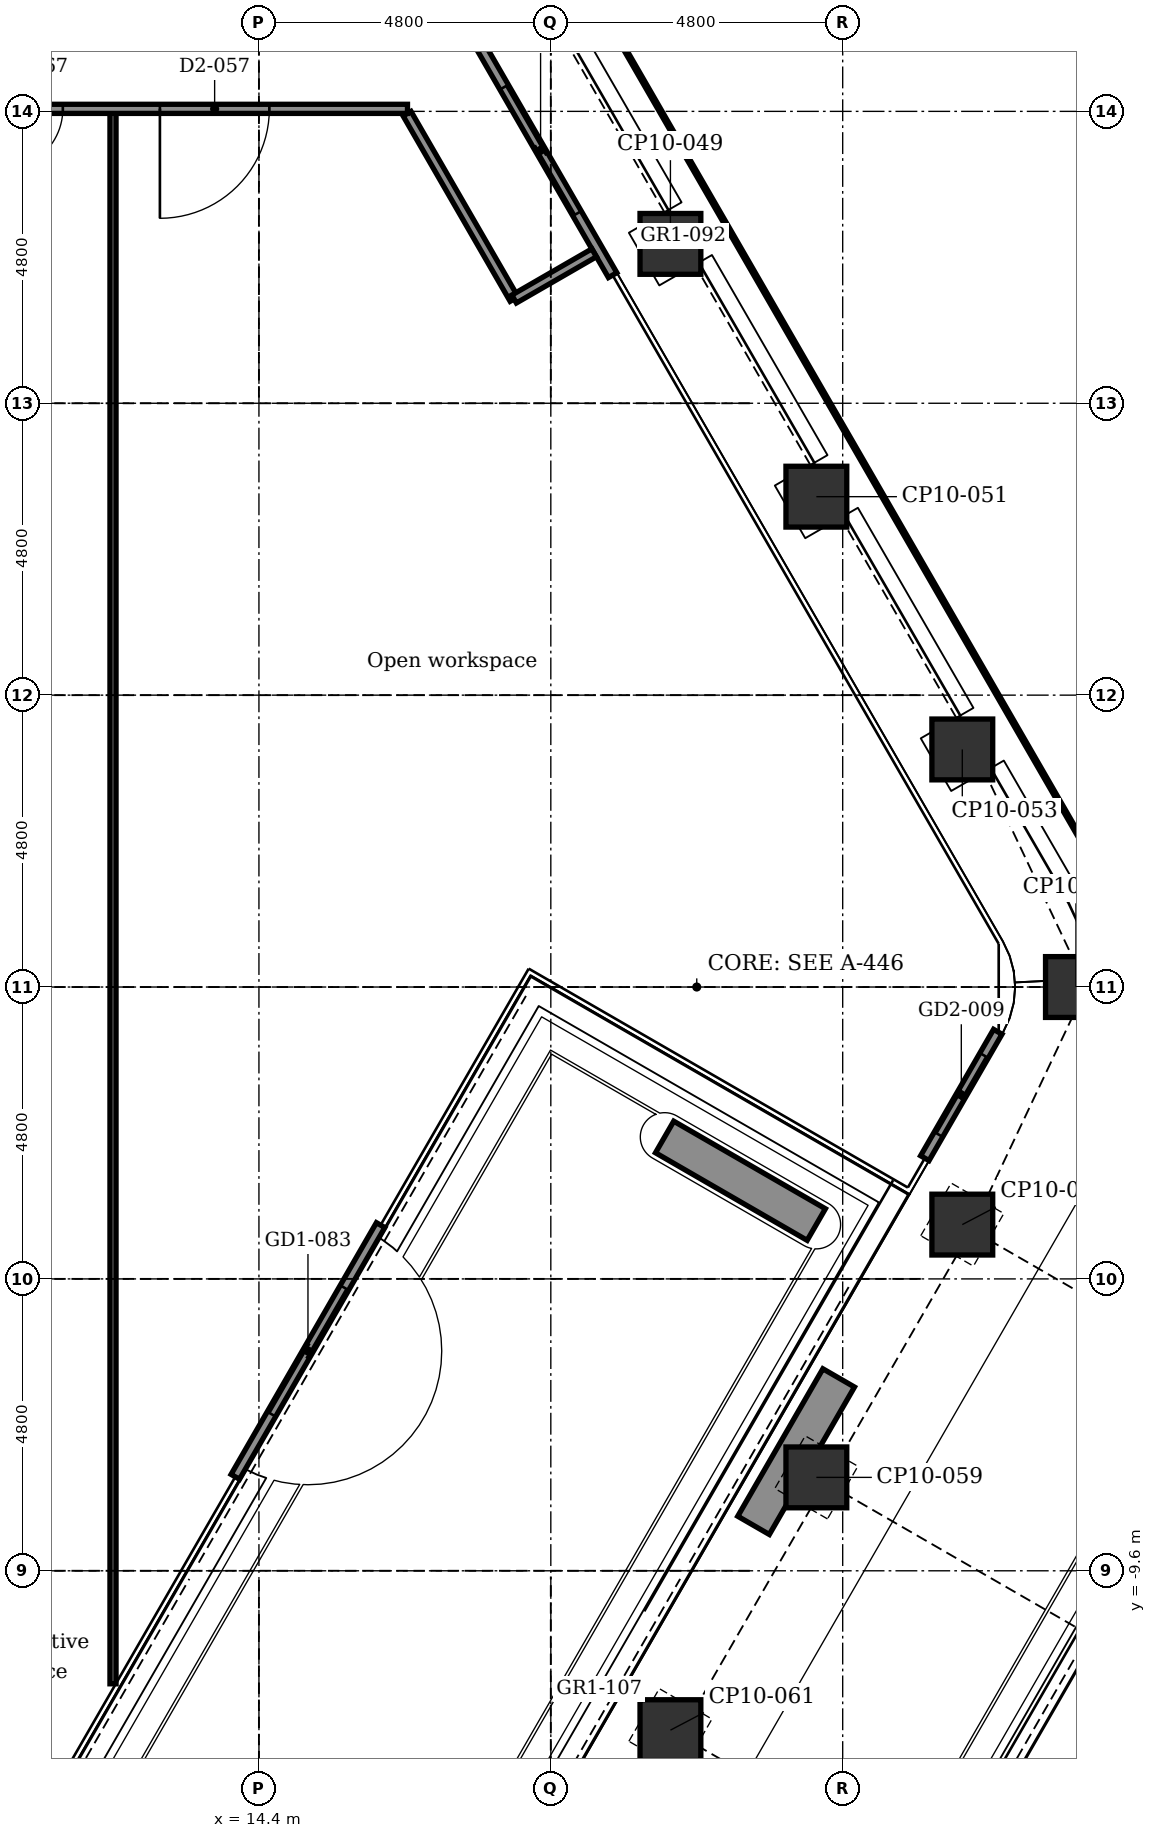
"""IFC4 building model, lengths in metres.
Left out: names, types, materials, properties, quantities, classifications, styles, units other than length and angle.
Written with IfcOpenShell. Run it as: python <this file> out.ifc"""

import sys

from ifc_helpers import new_model, si_unit, direction, frame, frame_2d, origin, origin_2d, place, context, subcontext, project, spatial, rectangle, extrude, element, fill, save


model = new_model("IFC4")
c1 = context("Model", 3, precision=1e-05, world=origin(), true_north=direction((0.0, 1.0)))
c2 = subcontext(c1, "Body", "Model", "MODEL_VIEW")
j1 = project(units=[si_unit("LENGTHUNIT", "METRE"), si_unit("PLANEANGLEUNIT", "RADIAN")], contexts=[c1])
p1 = place(None, origin())
s1 = spatial("IfcSite", under=j1, at=p1, CompositionType="ELEMENT")
p2 = place(p1, origin())
s2 = spatial("IfcBuilding", under=s1, at=p2, CompositionType="ELEMENT")
p3 = place(p2, frame((0.0, 0.0, 197.3)))
s3 = spatial("IfcBuildingStorey", under=s2, at=p3, CompositionType="ELEMENT", Elevation=197.3)
for number, where, z_axis, x_axis in (
    (1, (21.167, 12.221, -0.15), (0.0, 0.0, 1.0), (0.866, 0.5, 0.0)),
    (2, (23.567, 8.064, -0.15), (0.0, 0.0, 1.0), (0.866, 0.5, 0.0)),
    (3, (25.967, 3.907, -0.15), (0.0, 0.0, 1.0), (0.866, 0.5, 0.0)),
    (4, (27.836, 0.0, -0.15), (0.0, 0.0, 1.0), (1.0, 0.0, 0.0)),
    (5, (25.967, -3.907, -0.15), (0.0, 0.0, 1.0), (0.5, 0.866, 0.0)),
    (6, (23.567, -8.064, -0.15), (0.0, 0.0, 1.0), (0.5, 0.866, 0.0)),
    (7, (21.167, -12.221, -0.15), (0.0, 0.0, 1.0), (0.5, 0.866, 0.0)),
):
    element("IfcColumn", number, at=place(p3, frame(where, z_axis=z_axis, x_axis=x_axis)), inside=s3, PredefinedType="COLUMN", context=c2, shape_type="SweptSolid", body=[
        extrude(rectangle(XDim=1.0, YDim=1.0, at=origin_2d()), origin(), (0.0, 0.0, 1.0), 3.9),
    ])
p4 = place(p3, frame((17.847, 15.812, 0.0), z_axis=(0.0, 0.0, 1.0), x_axis=(0.5000167099, -0.866015756104, 0.0)))
e8 = element("IfcWall", 8, at=p4, inside=s3, PredefinedType="PARTITIONING", context=c2, shape_type="SweptSolid", body=[
    extrude(rectangle(XDim=4.74, YDim=0.16, at=frame_2d((2.37, 0.0))), origin(), (0.0, 0.0, 1.0), 3.75),
])
p5 = place(p4, frame((1.17, 0.0, 0.0)))
e9 = element("IfcOpeningElement", 9, at=p5, cuts=e8, PredefinedType="OPENING", context=c2, shape_type="SweptSolid", body=[
    extrude(rectangle(XDim=2.4, YDim=2.4, at=frame_2d((1.2, 1.2))), frame((0.0, 0.09, 0.0), z_axis=(0.0, -1.0, 0.0), x_axis=(1.0, 0.0, 0.0)), (0.0, 0.0, 1.0), 0.18),
])
p6 = place(p3, frame((26.551, -0.736, 0.0), z_axis=(0.0, 0.0, 1.0), x_axis=(-0.500001309137, -0.866024647952, 0.0)))
e10 = element("IfcWall", 10, at=p6, inside=s3, PredefinedType="PARTITIONING", context=c2, shape_type="SweptSolid", body=[
    extrude(rectangle(XDim=2.4, YDim=0.16, at=frame_2d((1.2, 0.0))), origin(), (0.0, 0.0, 1.0), 3.75),
])
p7 = place(p6, frame((0.45, 0.0, 0.0)))
e11 = element("IfcOpeningElement", 11, at=p7, cuts=e10, PredefinedType="OPENING", context=c2, shape_type="SweptSolid", body=[
    extrude(rectangle(XDim=1.5, YDim=2.4, at=frame_2d((0.75, 1.2))), frame((0.0, 0.09, 0.0), z_axis=(0.0, -1.0, 0.0), x_axis=(1.0, 0.0, 0.0)), (0.0, 0.0, 1.0), 0.18),
])
p8 = place(p3, frame((16.401, -3.915, 0.0), z_axis=(0.0, 0.0, 1.0), x_axis=(-0.500039310002, -0.866002706955, 0.0)))
e12 = element("IfcWall", 12, at=p8, inside=s3, PredefinedType="PARTITIONING", context=c2, shape_type="SweptSolid", body=[
    extrude(rectangle(XDim=4.78, YDim=0.16, at=frame_2d((2.39, 0.0))), origin(), (0.0, 0.0, 1.0), 3.75),
])
p9 = place(p8, frame((1.19, 0.0, 0.0)))
e13 = element("IfcOpeningElement", 13, at=p9, cuts=e12, PredefinedType="OPENING", context=c2, shape_type="SweptSolid", body=[
    extrude(rectangle(XDim=2.4, YDim=2.4, at=frame_2d((1.2, 1.2))), frame((0.0, 0.09, 0.0), z_axis=(0.0, -1.0, 0.0), x_axis=(1.0, 0.0, 0.0)), (0.0, 0.0, 1.0), 0.18),
])
p10 = place(p3, frame((21.072, -2.466, 0.0), z_axis=(0.0, 0.0, 1.0), x_axis=(0.865996417519, -0.500050202324, 0.0)))
e14 = element("IfcWall", 14, at=p10, inside=s3, PredefinedType="USERDEFINED", context=c2, shape_type="SweptSolid", body=[
    extrude(rectangle(XDim=2.88, YDim=0.6, at=frame_2d((1.44, 0.0))), origin(), (0.0, 0.0, 1.0), 0.7),
])
p11 = place(p3, frame((22.534, -8.853, 0.0), z_axis=(0.0, 0.0, 1.0), x_axis=(0.500049511043, 0.865996816683, 0.0)))
e15 = element("IfcWall", 15, at=p11, inside=s3, PredefinedType="USERDEFINED", context=c2, shape_type="SweptSolid", body=[
    extrude(rectangle(XDim=2.8, YDim=0.6, at=frame_2d((1.4, 0.0))), origin(), (0.0, 0.0, 1.0), 0.7),
])
p12 = place(p3, frame((12.0, -11.458, 0.0), z_axis=(0.0, 0.0, 1.0), x_axis=(0.0, 1.0, 0.0)))
e16 = element("IfcWall", 16, at=p12, inside=s3, PredefinedType="PARTITIONING", context=c2, shape_type="SweptSolid", body=[
    extrude(rectangle(XDim=25.9, YDim=0.1, at=frame_2d((12.95, 0.0))), origin(), (0.0, 0.0, 1.0), 3.75),
])
p13 = place(p3, frame((16.836, 14.362, 0.0), z_axis=(0.0, 0.0, 1.0), x_axis=(0.499980607609, -0.866036599697, 0.0)))
e17 = element("IfcWall", 17, at=p13, inside=s3, PredefinedType="PARTITIONING", context=c2, shape_type="SweptSolid", body=[
    extrude(rectangle(XDim=3.52, YDim=0.15, at=frame_2d((1.76, 0.0))), origin(), (0.0, 0.0, 1.0), 3.75),
])
p14 = place(p3, frame((18.596, 11.314, 0.0), z_axis=(0.0, 0.0, 1.0), x_axis=(0.866030456496, 0.499991248344, 0.0)))
e18 = element("IfcWall", 18, at=p14, inside=s3, PredefinedType="PARTITIONING", context=c2, shape_type="SweptSolid", body=[
    extrude(rectangle(XDim=1.52, YDim=0.15, at=frame_2d((0.76, 0.0))), origin(), (0.0, 0.0, 1.0), 3.75),
])
p15 = place(p3, frame((-3.0, 14.441, 0.0), z_axis=(0.0, 0.0, 1.0), x_axis=(1.0, 0.0, 0.0)))
e19 = element("IfcWall", 19, at=p15, inside=s3, PredefinedType="PARTITIONING", context=c2, shape_type="SweptSolid", body=[
    extrude(rectangle(XDim=19.843, YDim=0.15, at=frame_2d((9.921, 0.0))), origin(), (0.0, 0.0, 1.0), 3.75),
])
p16 = place(p15, frame((4.9, 0.0, 0.0)))
e20 = element("IfcOpeningElement", 20, at=p16, cuts=e19, PredefinedType="OPENING", context=c2, shape_type="SweptSolid", body=[
    extrude(rectangle(XDim=1.0, YDim=2.1, at=frame_2d((0.5, 1.05))), frame((0.0, 0.085, 0.0), z_axis=(0.0, -1.0, 0.0), x_axis=(1.0, 0.0, 0.0)), (0.0, 0.0, 1.0), 0.17),
])
p17 = place(p15, frame((9.7, 0.0, 0.0)))
e21 = element("IfcOpeningElement", 21, at=p17, cuts=e19, PredefinedType="OPENING", context=c2, shape_type="SweptSolid", body=[
    extrude(rectangle(XDim=1.0, YDim=2.1, at=frame_2d((0.5, 1.05))), frame((0.0, 0.085, 0.0), z_axis=(0.0, -1.0, 0.0), x_axis=(1.0, 0.0, 0.0)), (0.0, 0.0, 1.0), 0.17),
])
p18 = place(p15, frame((13.175, 0.0, 0.0)))
e22 = element("IfcOpeningElement", 22, at=p18, cuts=e19, PredefinedType="OPENING", context=c2, shape_type="SweptSolid", body=[
    extrude(rectangle(XDim=1.0, YDim=2.1, at=frame_2d((0.5, 1.05))), frame((0.0, 0.085, 0.0), z_axis=(0.0, -1.0, 0.0), x_axis=(1.0, 0.0, 0.0)), (0.0, 0.0, 1.0), 0.17),
])
p19 = place(p15, frame((15.771, 0.0, 0.0)))
e23 = element("IfcOpeningElement", 23, at=p19, cuts=e19, PredefinedType="OPENING", context=c2, shape_type="SweptSolid", body=[
    extrude(rectangle(XDim=1.8, YDim=2.1, at=frame_2d((0.9, 1.05))), frame((0.0, 0.085, 0.0), z_axis=(0.0, -1.0, 0.0), x_axis=(1.0, 0.0, 0.0)), (0.0, 0.0, 1.0), 0.17),
])
p20 = place(p5, origin())
e24 = element("IfcDoor", 24, at=p20, inside=s3, OperationType="DOUBLE_DOOR_SLIDING", PredefinedType="DOOR", context=c2, shape_type="SweptSolid", body=[
    extrude(rectangle(XDim=2.4, YDim=2.4, at=frame_2d((1.2, 1.2))), frame((0.0, 0.025, 0.0), z_axis=(0.0, -1.0, 0.0), x_axis=(1.0, 0.0, 0.0)), (0.0, 0.0, 1.0), 0.05),
])
fill(e9, e24)
p21 = place(p7, origin())
e25 = element("IfcDoor", 25, at=p21, inside=s3, OperationType="DOUBLE_DOOR_SLIDING", PredefinedType="DOOR", context=c2, shape_type="SweptSolid", body=[
    extrude(rectangle(XDim=1.5, YDim=2.4, at=frame_2d((0.75, 1.2))), frame((0.0, 0.025, 0.0), z_axis=(0.0, -1.0, 0.0), x_axis=(1.0, 0.0, 0.0)), (0.0, 0.0, 1.0), 0.05),
])
fill(e11, e25)
p22 = place(p9, origin())
e26 = element("IfcDoor", 26, at=p22, inside=s3, OperationType="DOUBLE_DOOR_SLIDING", PredefinedType="DOOR", context=c2, shape_type="SweptSolid", body=[
    extrude(rectangle(XDim=2.4, YDim=2.4, at=frame_2d((1.2, 1.2))), frame((0.0, 0.025, 0.0), z_axis=(0.0, -1.0, 0.0), x_axis=(1.0, 0.0, 0.0)), (0.0, 0.0, 1.0), 0.05),
])
fill(e13, e26)
p23 = place(p18, frame((1.0, 0.0, 0.0), z_axis=(0.0, 0.0, 1.0), x_axis=(-1.0, 0.0, 0.0)))
e27 = element("IfcDoor", 27, at=p23, inside=s3, OperationType="SINGLE_SWING_LEFT", PredefinedType="DOOR", context=c2, shape_type="SweptSolid", body=[
    extrude(rectangle(XDim=1.0, YDim=2.1, at=frame_2d((0.5, 1.05))), frame((0.0, 0.025, 0.0), z_axis=(0.0, -1.0, 0.0), x_axis=(1.0, 0.0, 0.0)), (0.0, 0.0, 1.0), 0.05),
])
fill(e22, e27)
p24 = place(p19, frame((1.8, 0.0, 0.0), z_axis=(0.0, 0.0, 1.0), x_axis=(-1.0, 0.0, 0.0)))
e28 = element("IfcDoor", 28, at=p24, inside=s3, OperationType="SINGLE_SWING_LEFT", PredefinedType="DOOR", context=c2, shape_type="SweptSolid", body=[
    extrude(rectangle(XDim=1.8, YDim=2.1, at=frame_2d((0.9, 1.05))), frame((0.0, 0.025, 0.0), z_axis=(0.0, -1.0, 0.0), x_axis=(1.0, 0.0, 0.0)), (0.0, 0.0, 1.0), 0.05),
])
fill(e23, e28)
save(model, sys.argv[1])
